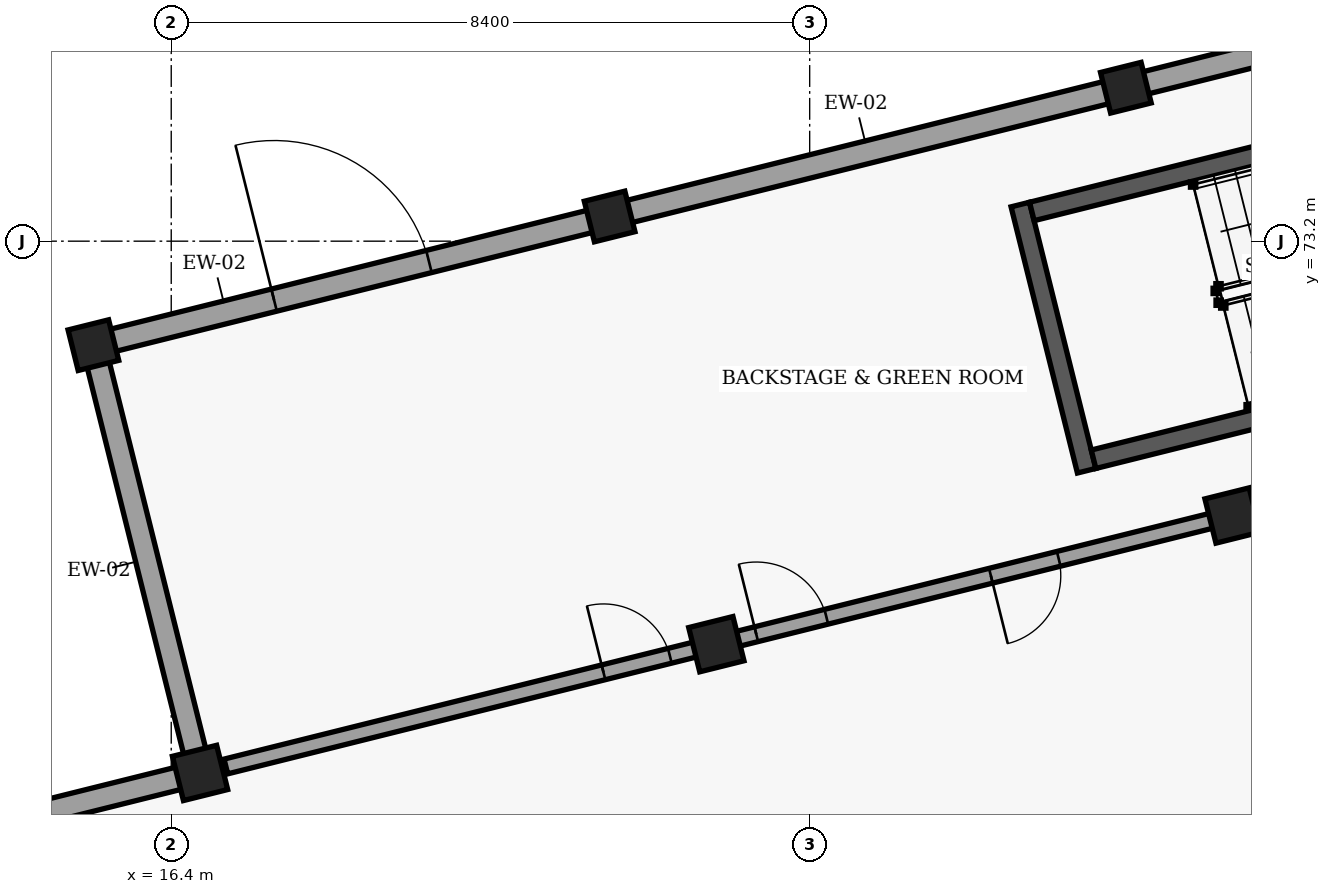
"""IFC4 building model, lengths in metres.
Left out: names, types, materials, properties, quantities, classifications, styles, units other than length and angle.
Written with IfcOpenShell. Run it as: python <this file> out.ifc"""

import sys

from ifc_helpers import new_model, si_unit, direction, frame, frame_2d, origin, origin_2d, place, context, subcontext, project, spatial, rectangle, extrude, element, fill, save


model = new_model("IFC4")
c1 = context("Model", 3, precision=1e-05, world=origin(), true_north=direction((0.0, 1.0)))
c2 = subcontext(c1, "Body", "Model", "MODEL_VIEW")
j1 = project(units=[si_unit("LENGTHUNIT", "METRE"), si_unit("PLANEANGLEUNIT", "RADIAN")], contexts=[c1])
p1 = place(None, origin())
s1 = spatial("IfcSite", under=j1, at=p1, CompositionType="ELEMENT")
p2 = place(p1, origin())
s2 = spatial("IfcBuilding", under=s1, at=p2, CompositionType="ELEMENT")
p3 = place(p2, origin())
s3 = spatial("IfcBuildingStorey", under=s2, at=p3, CompositionType="ELEMENT", Elevation=0.0)
for number, where, z_axis, x_axis in (
    (1, (16.779, 66.204, 0.0), (0.0, 0.0, 1.0), (0.97, 0.242, 0.0)),
    (2, (23.572, 67.898, 0.0), (0.0, 0.0, 1.0), (0.97, 0.242, 0.0)),
    (3, (30.364, 69.591, 0.0), (0.0, 0.0, 1.0), (0.97, 0.242, 0.0)),
):
    element("IfcColumn", number, at=place(p3, frame(where, z_axis=z_axis, x_axis=x_axis)), inside=s3, PredefinedType="COLUMN", context=c2, shape_type="SweptSolid", body=[
        extrude(rectangle(XDim=0.6, YDim=0.6, at=origin_2d()), origin(), (0.0, 0.0, 1.0), 4.8),
    ])
for number, where, z_axis, x_axis in (
    (4, (15.376, 71.832, 0.0), (0.0, 0.0, 1.0), (0.97, 0.242, 0.0)),
    (5, (22.168, 73.525, 0.0), (0.0, 0.0, 1.0), (0.97, 0.242, 0.0)),
    (6, (28.96, 75.219, 0.0), (0.0, 0.0, 1.0), (0.97, 0.242, 0.0)),
):
    element("IfcColumn", number, at=place(p3, frame(where, z_axis=z_axis, x_axis=x_axis)), inside=s3, PredefinedType="COLUMN", context=c2, shape_type="SweptSolid", body=[
        extrude(rectangle(XDim=0.55, YDim=0.55, at=origin_2d()), origin(), (0.0, 0.0, 1.0), 4.8),
    ])
p4 = place(p3, frame((10.065, 64.53, 0.0), z_axis=(0.0, 0.0, 1.0), x_axis=(0.97027883487, 0.241989633258, 0.0)))
e7 = element("IfcWall", 7, at=p4, inside=s3, PredefinedType="SOLIDWALL", context=c2, shape_type="SweptSolid", body=[
    extrude(rectangle(XDim=6.839, YDim=0.3, at=frame_2d((3.42, 0.0))), origin(), (0.0, 0.0, 1.0), 4.085),
])
p5 = place(p3, frame((16.76, 66.282, 0.0), z_axis=(0.0, 0.0, 1.0), x_axis=(-0.242036480393, 0.970267149892, 0.0)))
e8 = element("IfcWall", 8, at=p5, inside=s3, PredefinedType="SOLIDWALL", context=c2, shape_type="SweptSolid", body=[
    extrude(rectangle(XDim=5.64, YDim=0.3, at=frame_2d((2.82, 0.0))), origin(), (0.0, 0.0, 1.0), 4.095),
])
p6 = place(p3, frame((15.473, 71.856, 0.0), z_axis=(0.0, 0.0, 1.0), x_axis=(0.970298579828, 0.24191045034, 0.0)))
e9 = element("IfcWall", 9, at=p6, inside=s3, PredefinedType="SOLIDWALL", context=c2, shape_type="SweptSolid", body=[
    extrude(rectangle(XDim=6.8, YDim=0.3, at=frame_2d((3.4, 0.0))), origin(), (0.0, 0.0, 1.0), 4.065),
])
p7 = place(p6, frame((2.35, 0.0, 0.0)))
e10 = element("IfcOpeningElement", 10, at=p7, cuts=e9, PredefinedType="OPENING", context=c2, shape_type="SweptSolid", body=[
    extrude(rectangle(XDim=2.1, YDim=2.35, at=frame_2d((1.05, 1.175))), frame((0.0, 0.16, 0.0), z_axis=(0.0, -1.0, 0.0), x_axis=(1.0, 0.0, 0.0)), (0.0, 0.0, 1.0), 0.32),
])
p8 = place(p3, frame((22.265, 73.55, 0.0), z_axis=(0.0, 0.0, 1.0), x_axis=(0.970298579828, 0.24191045034, 0.0)))
e11 = element("IfcWall", 11, at=p8, inside=s3, PredefinedType="SOLIDWALL", context=c2, shape_type="SweptSolid", body=[
    extrude(rectangle(XDim=6.8, YDim=0.3, at=frame_2d((3.4, 0.0))), origin(), (0.0, 0.0, 1.0), 4.065),
])
p9 = place(p3, frame((29.058, 75.243, 0.0), z_axis=(0.0, 0.0, 1.0), x_axis=(0.970296478685, 0.241918877831, 0.0)))
e12 = element("IfcWall", 12, at=p9, inside=s3, PredefinedType="SOLIDWALL", context=c2, shape_type="SweptSolid", body=[
    extrude(rectangle(XDim=6.8, YDim=0.3, at=frame_2d((3.4, 0.0))), origin(), (0.0, 0.0, 1.0), 4.065),
])
p10 = place(p3, frame((28.444, 70.18, 0.0), z_axis=(0.0, 0.0, 1.0), x_axis=(-0.241898912952, 0.970301456204, 0.0)))
e13 = element("IfcWall", 13, at=p10, inside=s3, PredefinedType="SHEAR", context=c2, shape_type="SweptSolid", body=[
    extrude(rectangle(XDim=3.609, YDim=0.25, at=frame_2d((1.805, 0.0))), origin(), (0.0, 0.0, 1.0), 4.56),
])
p11 = place(p3, frame((35.706, 72.119, 0.0), z_axis=(0.0, 0.0, 1.0), x_axis=(-0.970299691856, -0.241905989972, 0.0)))
e14 = element("IfcWall", 14, at=p11, inside=s3, PredefinedType="SHEAR", context=c2, shape_type="SweptSolid", body=[
    extrude(rectangle(XDim=7.391, YDim=0.25, at=frame_2d((3.695, 0.0))), origin(), (0.0, 0.0, 1.0), 4.56),
])
p12 = place(p3, frame((27.723, 73.591, 0.0), z_axis=(0.0, 0.0, 1.0), x_axis=(0.970291958031, 0.241937008705, 0.0)))
e15 = element("IfcWall", 15, at=p12, inside=s3, PredefinedType="SHEAR", context=c2, shape_type="SweptSolid", body=[
    extrude(rectangle(XDim=7.39, YDim=0.25, at=frame_2d((3.695, 0.0))), origin(), (0.0, 0.0, 1.0), 4.56),
])
p13 = place(p3, frame((17.119, 66.289, 0.0), z_axis=(0.0, 0.0, 1.0), x_axis=(0.970297233618, 0.241915849902, 0.0)))
e16 = element("IfcWall", 16, at=p13, inside=s3, PredefinedType="PARTITIONING", context=c2, shape_type="SweptSolid", body=[
    extrude(rectangle(XDim=20.3, YDim=0.2, at=frame_2d((10.15, 0.0))), origin(), (0.0, 0.0, 1.0), 3.845),
])
p14 = place(p13, frame((7.192, 0.0, 0.0)))
e17 = element("IfcOpeningElement", 17, at=p14, cuts=e16, PredefinedType="OPENING", context=c2, shape_type="SweptSolid", body=[
    extrude(rectangle(XDim=0.95, YDim=2.12, at=frame_2d((0.475, 1.06))), frame((0.0, 0.11, 0.0), z_axis=(0.0, -1.0, 0.0), x_axis=(1.0, 0.0, 0.0)), (0.0, 0.0, 1.0), 0.22),
])
p15 = place(p13, frame((10.373, 0.0, 0.0)))
e18 = element("IfcOpeningElement", 18, at=p15, cuts=e16, PredefinedType="OPENING", context=c2, shape_type="SweptSolid", body=[
    extrude(rectangle(XDim=0.92, YDim=2.1, at=frame_2d((0.46, 1.05))), frame((0.0, 0.11, 0.0), z_axis=(0.0, -1.0, 0.0), x_axis=(1.0, 0.0, 0.0)), (0.0, 0.0, 1.0), 0.22),
])
p16 = place(p13, frame((5.12, 0.0, 0.0)))
e19 = element("IfcOpeningElement", 19, at=p16, cuts=e16, PredefinedType="OPENING", context=c2, shape_type="SweptSolid", body=[
    extrude(rectangle(XDim=0.9, YDim=2.06, at=frame_2d((0.45, 1.03))), frame((0.0, 0.11, 0.0), z_axis=(0.0, -1.0, 0.0), x_axis=(1.0, 0.0, 0.0)), (0.0, 0.0, 1.0), 0.22),
])
p17 = place(p13, frame((16.03, 0.0, 0.0)))
e20 = element("IfcOpeningElement", 20, at=p17, cuts=e16, PredefinedType="OPENING", context=c2, shape_type="SweptSolid", body=[
    extrude(rectangle(XDim=0.9, YDim=2.06, at=frame_2d((0.45, 1.03))), frame((0.0, 0.11, 0.0), z_axis=(0.0, -1.0, 0.0), x_axis=(1.0, 0.0, 0.0)), (0.0, 0.0, 1.0), 0.22),
])
p18 = place(p7, origin())
e21 = element("IfcDoor", 21, at=p18, inside=s3, OperationType="DOUBLE_DOOR_SINGLE_SWING", PredefinedType="DOOR", context=c2, shape_type="SweptSolid", body=[
    extrude(rectangle(XDim=2.1, YDim=2.35, at=frame_2d((1.05, 1.175))), frame((0.0, 0.025, 0.0), z_axis=(0.0, -1.0, 0.0), x_axis=(1.0, 0.0, 0.0)), (0.0, 0.0, 1.0), 0.05),
])
fill(e10, e21)
p19 = place(p14, origin())
e22 = element("IfcDoor", 22, at=p19, inside=s3, OperationType="SINGLE_SWING_LEFT", PredefinedType="DOOR", context=c2, shape_type="SweptSolid", body=[
    extrude(rectangle(XDim=0.95, YDim=2.12, at=frame_2d((0.475, 1.06))), frame((0.0, 0.025, 0.0), z_axis=(0.0, -1.0, 0.0), x_axis=(1.0, 0.0, 0.0)), (0.0, 0.0, 1.0), 0.05),
])
fill(e17, e22)
p20 = place(p15, origin())
e23 = element("IfcDoor", 23, at=p20, inside=s3, OperationType="SINGLE_SWING_RIGHT", PredefinedType="DOOR", context=c2, shape_type="SweptSolid", body=[
    extrude(rectangle(XDim=0.92, YDim=2.1, at=frame_2d((0.46, 1.05))), frame((0.0, 0.025, 0.0), z_axis=(0.0, -1.0, 0.0), x_axis=(1.0, 0.0, 0.0)), (0.0, 0.0, 1.0), 0.05),
])
fill(e18, e23)
p21 = place(p16, origin())
e24 = element("IfcDoor", 24, at=p21, inside=s3, OperationType="SINGLE_SWING_LEFT", PredefinedType="DOOR", context=c2, shape_type="SweptSolid", body=[
    extrude(rectangle(XDim=0.9, YDim=2.06, at=frame_2d((0.45, 1.03))), frame((0.0, 0.025, 0.0), z_axis=(0.0, -1.0, 0.0), x_axis=(1.0, 0.0, 0.0)), (0.0, 0.0, 1.0), 0.05),
])
fill(e19, e24)
save(model, sys.argv[1])
